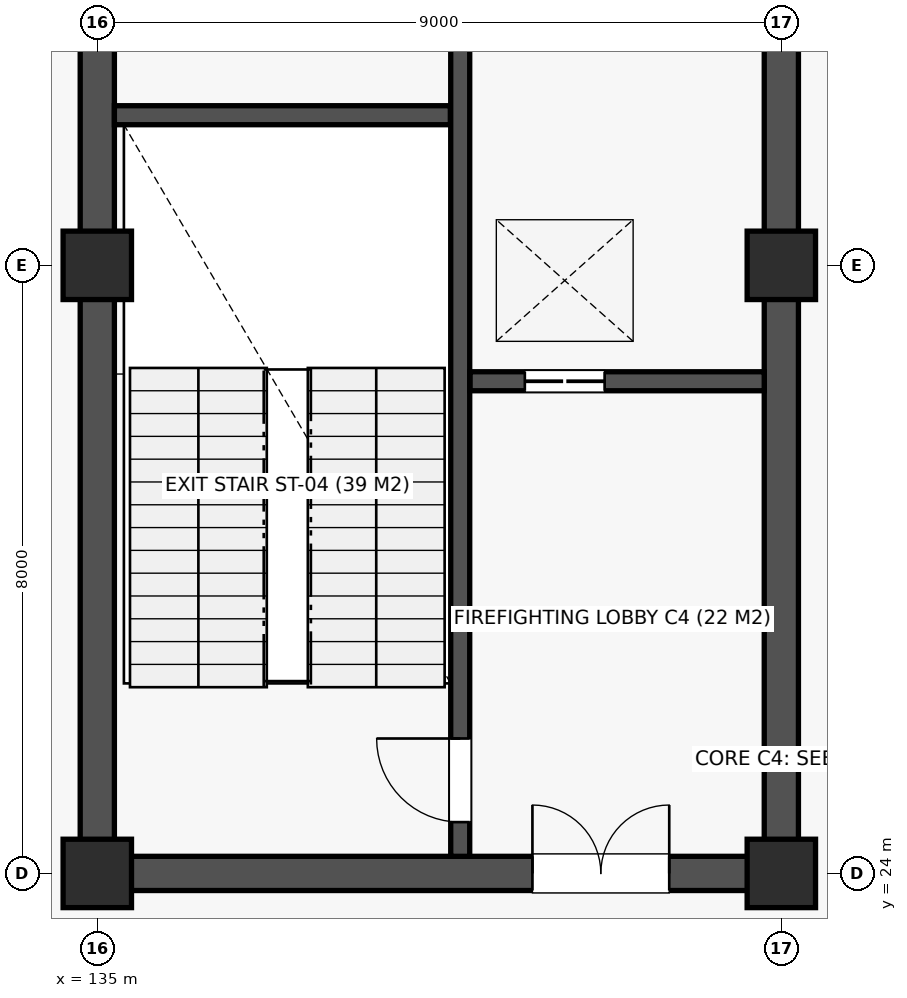
"""IFC4 building model, lengths in metres.
Left out: names, types, materials, properties, quantities, classifications, styles, units other than length and angle.
Written with IfcOpenShell. Run it as: python <this file> out.ifc"""

import sys

from ifc_helpers import new_model, si_unit, direction, frame, frame_2d, origin, origin_2d, place, context, subcontext, project, spatial, rectangle, extrude, element, fill, save


model = new_model("IFC4")
c1 = context("Model", 3, precision=1e-05, world=origin(), true_north=direction((0.0, 1.0)))
c2 = subcontext(c1, "Body", "Model", "MODEL_VIEW")
j1 = project(units=[si_unit("LENGTHUNIT", "METRE"), si_unit("PLANEANGLEUNIT", "RADIAN")], contexts=[c1])
p1 = place(None, origin())
s1 = spatial("IfcSite", under=j1, at=p1, CompositionType="ELEMENT")
p2 = place(p1, origin())
s2 = spatial("IfcBuilding", under=s1, at=p2, CompositionType="ELEMENT")
p3 = place(p2, frame((0.0, 0.0, -4.5)))
s3 = spatial("IfcBuildingStorey", under=s2, at=p3, CompositionType="ELEMENT", Elevation=-4.5)
for number, where, z_axis, x_axis in (
    (1, (135.0, 24.0, 0.0), (0.0, 0.0, 1.0), (1.0, 0.0, 0.0)),
    (2, (135.0, 32.0, 0.0), (0.0, 0.0, 1.0), (1.0, 0.0, 0.0)),
    (3, (144.0, 24.0, 0.0), (0.0, 0.0, 1.0), (1.0, 0.0, 0.0)),
    (4, (144.0, 32.0, 0.0), (0.0, 0.0, 1.0), (1.0, 0.0, 0.0)),
):
    element("IfcColumn", number, at=place(p3, frame(where, z_axis=z_axis, x_axis=x_axis)), inside=s3, PredefinedType="COLUMN", context=c2, shape_type="SweptSolid", body=[
        extrude(rectangle(XDim=0.9, YDim=0.9, at=origin_2d()), origin(), (0.0, 0.0, 1.0), 4.5),
    ])
p4 = place(p3, frame((135.225, 24.0, 0.0), z_axis=(0.0, 0.0, 1.0), x_axis=(1.0, 0.0, 0.0)))
e5 = element("IfcWall", 5, at=p4, inside=s3, PredefinedType="SHEAR", context=c2, shape_type="SweptSolid", body=[
    extrude(rectangle(XDim=8.55, YDim=0.45, at=frame_2d((4.275, 0.0))), origin(), (0.0, 0.0, 1.0), 4.15),
])
p5 = place(p4, frame((5.5, 0.0, 0.0)))
e6 = element("IfcOpeningElement", 6, at=p5, cuts=e5, PredefinedType="OPENING", context=c2, shape_type="SweptSolid", body=[
    extrude(rectangle(XDim=1.8, YDim=2.18, at=frame_2d((0.9, 1.09))), frame((0.0, 0.237, 0.0), z_axis=(0.0, -1.0, 0.0), x_axis=(1.0, 0.0, 0.0)), (0.0, 0.0, 1.0), 0.474),
])
p6 = place(p3, frame((135.0, 24.225, 0.0), z_axis=(0.0, 0.0, 1.0), x_axis=(0.0, 1.0, 0.0)))
e7 = element("IfcWall", 7, at=p6, inside=s3, PredefinedType="SHEAR", context=c2, shape_type="SweptSolid", body=[
    extrude(rectangle(XDim=15.55, YDim=0.45, at=frame_2d((7.775, 0.0))), origin(), (0.0, 0.0, 1.0), 4.15),
])
p7 = place(p6, frame((11.2, 0.0, 0.0)))
e8 = element("IfcOpeningElement", 8, at=p7, cuts=e7, PredefinedType="OPENING", context=c2, shape_type="SweptSolid", body=[
    extrude(rectangle(XDim=0.95, YDim=2.1, at=frame_2d((0.475, 1.05))), frame((0.0, 0.237, 0.0), z_axis=(0.0, -1.0, 0.0), x_axis=(1.0, 0.0, 0.0)), (0.0, 0.0, 1.0), 0.474),
])
p8 = place(p3, frame((144.0, 24.225, 0.0), z_axis=(0.0, 0.0, 1.0), x_axis=(0.0, 1.0, 0.0)))
e9 = element("IfcWall", 9, at=p8, inside=s3, PredefinedType="SHEAR", context=c2, shape_type="SweptSolid", body=[
    extrude(rectangle(XDim=15.55, YDim=0.45, at=frame_2d((7.775, 0.0))), origin(), (0.0, 0.0, 1.0), 4.15),
])
p9 = place(p3, frame((139.775, 24.225, 0.0), z_axis=(0.0, 0.0, 1.0), x_axis=(0.0, 1.0, 0.0)))
e10 = element("IfcWall", 10, at=p9, inside=s3, PredefinedType="SOLIDWALL", context=c2, shape_type="SweptSolid", body=[
    extrude(rectangle(XDim=15.55, YDim=0.25, at=frame_2d((7.775, 0.0))), origin(), (0.0, 0.0, 1.0), 4.15),
])
p10 = place(p9, frame((0.45, 0.0, 0.0)))
e11 = element("IfcOpeningElement", 11, at=p10, cuts=e10, PredefinedType="OPENING", context=c2, shape_type="SweptSolid", body=[
    extrude(rectangle(XDim=1.1, YDim=2.15, at=frame_2d((0.55, 1.075))), frame((0.0, 0.137, 0.0), z_axis=(0.0, -1.0, 0.0), x_axis=(1.0, 0.0, 0.0)), (0.0, 0.0, 1.0), 0.274),
])
p11 = place(p3, frame((135.225, 33.975, 0.0), z_axis=(0.0, 0.0, 1.0), x_axis=(1.0, 0.0, 0.0)))
e12 = element("IfcWall", 12, at=p11, inside=s3, PredefinedType="SOLIDWALL", context=c2, shape_type="SweptSolid", body=[
    extrude(rectangle(XDim=4.42, YDim=0.25, at=frame_2d((2.21, 0.0))), origin(), (0.0, 0.0, 1.0), 4.15),
])
p12 = place(p3, frame((139.905, 30.475, 0.0), z_axis=(0.0, 0.0, 1.0), x_axis=(1.0, 0.0, 0.0)))
e13 = element("IfcWall", 13, at=p12, inside=s3, PredefinedType="SOLIDWALL", context=c2, shape_type="SweptSolid", body=[
    extrude(rectangle(XDim=3.87, YDim=0.25, at=frame_2d((1.935, 0.0))), origin(), (0.0, 0.0, 1.0), 4.15),
])
p13 = place(p12, frame((0.72, 0.0, 0.0)))
e14 = element("IfcOpeningElement", 14, at=p13, cuts=e13, PredefinedType="OPENING", context=c2, shape_type="SweptSolid", body=[
    extrude(rectangle(XDim=1.05, YDim=2.12, at=frame_2d((0.525, 1.06))), frame((0.0, 0.137, 0.0), z_axis=(0.0, -1.0, 0.0), x_axis=(1.0, 0.0, 0.0)), (0.0, 0.0, 1.0), 0.274),
])
p14 = place(p5, origin())
e15 = element("IfcDoor", 15, at=p14, inside=s3, OperationType="DOUBLE_DOOR_SINGLE_SWING", PredefinedType="DOOR", context=c2, shape_type="SweptSolid", body=[
    extrude(rectangle(XDim=1.8, YDim=2.18, at=frame_2d((0.9, 1.09))), frame((0.0, 0.025, 0.0), z_axis=(0.0, -1.0, 0.0), x_axis=(1.0, 0.0, 0.0)), (0.0, 0.0, 1.0), 0.05),
])
fill(e6, e15)
p15 = place(p10, origin())
e16 = element("IfcDoor", 16, at=p15, inside=s3, OperationType="SINGLE_SWING_RIGHT", PredefinedType="DOOR", context=c2, shape_type="SweptSolid", body=[
    extrude(rectangle(XDim=1.1, YDim=2.15, at=frame_2d((0.55, 1.075))), frame((0.0, 0.025, 0.0), z_axis=(0.0, -1.0, 0.0), x_axis=(1.0, 0.0, 0.0)), (0.0, 0.0, 1.0), 0.05),
])
fill(e11, e16)
p16 = place(p13, origin())
e17 = element("IfcDoor", 17, at=p16, inside=s3, OperationType="DOUBLE_DOOR_SLIDING", PredefinedType="DOOR", context=c2, shape_type="SweptSolid", body=[
    extrude(rectangle(XDim=1.05, YDim=2.12, at=frame_2d((0.525, 1.06))), frame((0.0, 0.025, 0.0), z_axis=(0.0, -1.0, 0.0), x_axis=(1.0, 0.0, 0.0)), (0.0, 0.0, 1.0), 0.05),
])
fill(e14, e17)
save(model, sys.argv[1])
